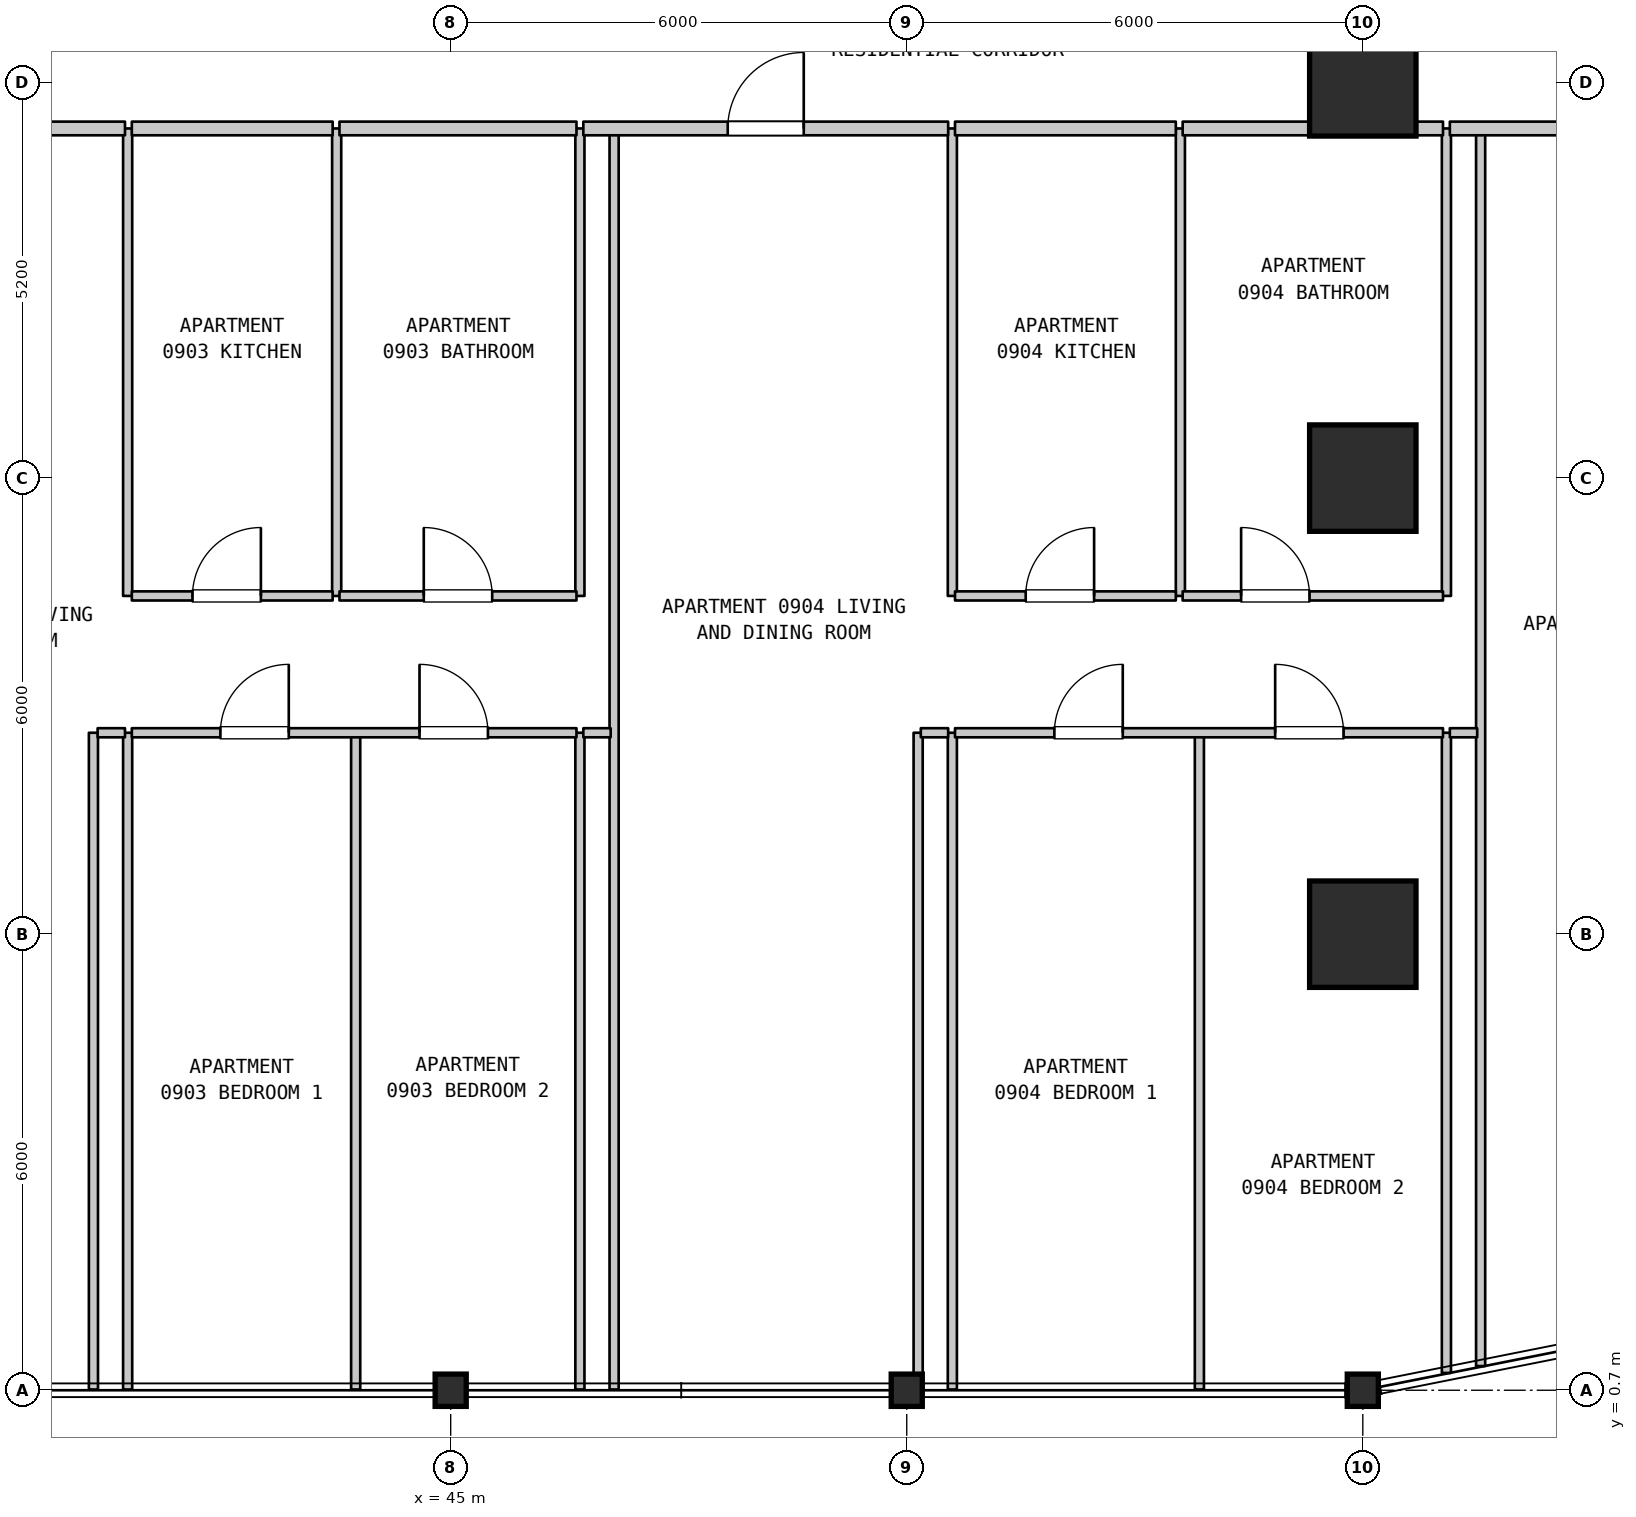
"""IFC4 building model, lengths in metres.
Left out: names, types, materials, properties, quantities, classifications, styles, units other than length and angle.
Written with IfcOpenShell. Run it as: python <this file> out.ifc"""

import sys

from ifc_helpers import new_model, si_unit, direction, frame, frame_2d, origin, origin_2d, place, context, subcontext, project, spatial, rectangle, i_section, extrude, element, fill, save


model = new_model("IFC4")
c1 = context("Model", 3, precision=1e-05, world=origin(), true_north=direction((0.0, 1.0)))
c2 = subcontext(c1, "Body", "Model", "MODEL_VIEW")
j1 = project(units=[si_unit("LENGTHUNIT", "METRE"), si_unit("PLANEANGLEUNIT", "RADIAN")], contexts=[c1])
p1 = place(None, origin())
s1 = spatial("IfcSite", under=j1, at=p1, CompositionType="ELEMENT")
p2 = place(p1, origin())
s2 = spatial("IfcBuilding", under=s1, at=p2, CompositionType="ELEMENT")
p3 = place(p2, frame((0.0, 0.0, 42.5)))
s3 = spatial("IfcBuildingStorey", under=s2, at=p3, CompositionType="ELEMENT", Elevation=42.5)
for number, where, z_axis, x_axis in (
    (1, (45.0, 0.7, 0.0), (0.0, 0.0, 1.0), (1.0, 0.0, 0.0)),
    (2, (51.0, 0.7, 0.0), (0.0, 0.0, 1.0), (1.0, 0.0, 0.0)),
    (3, (57.0, 0.7, 0.0), (0.0, 0.0, 1.0), (1.0, 0.0, 0.0)),
):
    element("IfcColumn", number, at=place(p3, frame(where, z_axis=z_axis, x_axis=x_axis)), inside=s3, PredefinedType="COLUMN", context=c2, shape_type="SweptSolid", body=[
        extrude(i_section(OverallWidth=0.409, OverallDepth=0.425, WebThickness=0.032, FlangeThickness=0.052, FilletRadius=0.015, at=origin_2d()), origin(), (0.0, 0.0, 1.0), 3.7),
    ])
for number, where, z_axis, x_axis in (
    (4, (57.0, 6.7, 0.0), (0.0, 0.0, 1.0), (1.0, 0.0, 0.0)),
    (5, (57.0, 12.7, 0.0), (0.0, 0.0, 1.0), (1.0, 0.0, 0.0)),
    (6, (57.0, 17.9, 0.0), (0.0, 0.0, 1.0), (1.0, 0.0, 0.0)),
):
    element("IfcColumn", number, at=place(p3, frame(where, z_axis=z_axis, x_axis=x_axis)), inside=s3, PredefinedType="COLUMN", context=c2, shape_type="SweptSolid", body=[
        extrude(rectangle(XDim=1.4, YDim=1.4, at=origin_2d()), origin(), (0.0, 0.0, 1.0), 3.7),
    ])
for number, where, z_axis, x_axis in (
    (7, (40.3, 0.71, 0.0), (0.0, 0.0, 1.0), (0.0, 1.0, 0.0)),
    (8, (40.75, 0.71, 0.0), (0.0, 0.0, 1.0), (0.0, 1.0, 0.0)),
):
    element("IfcWall", number, at=place(p3, frame(where, z_axis=z_axis, x_axis=x_axis)), inside=s3, PredefinedType="PARTITIONING", context=c2, shape_type="SweptSolid", body=[
        extrude(rectangle(XDim=8.64, YDim=0.12, at=frame_2d((4.32, 0.0))), origin(), (0.0, 0.0, 1.0), 3.385),
    ])
for number, where, z_axis, x_axis in (
    (9, (40.75, 11.15, 0.0), (0.0, 0.0, 1.0), (0.0, 1.0, 0.0)),
    (10, (43.5, 11.15, 0.0), (0.0, 0.0, 1.0), (0.0, 1.0, 0.0)),
):
    element("IfcWall", number, at=place(p3, frame(where, z_axis=z_axis, x_axis=x_axis)), inside=s3, PredefinedType="PARTITIONING", context=c2, shape_type="SweptSolid", body=[
        extrude(rectangle(XDim=6.15, YDim=0.12, at=frame_2d((3.075, 0.0))), origin(), (0.0, 0.0, 1.0), 3.385),
    ])
for number, where, z_axis, x_axis in (
    (11, (43.75, 0.71, 0.0), (0.0, 0.0, 1.0), (0.0, 1.0, 0.0)),
    (12, (46.7, 0.71, 0.0), (0.0, 0.0, 1.0), (0.0, 1.0, 0.0)),
):
    element("IfcWall", number, at=place(p3, frame(where, z_axis=z_axis, x_axis=x_axis)), inside=s3, PredefinedType="PARTITIONING", context=c2, shape_type="SweptSolid", body=[
        extrude(rectangle(XDim=8.64, YDim=0.12, at=frame_2d((4.32, 0.0))), origin(), (0.0, 0.0, 1.0), 3.385),
    ])
p4 = place(p3, frame((46.7, 11.15, 0.0), z_axis=(0.0, 0.0, 1.0), x_axis=(0.0, 1.0, 0.0)))
e13 = element("IfcWall", 13, at=p4, inside=s3, PredefinedType="PARTITIONING", context=c2, shape_type="SweptSolid", body=[
    extrude(rectangle(XDim=6.15, YDim=0.12, at=frame_2d((3.075, 0.0))), origin(), (0.0, 0.0, 1.0), 3.385),
])
p5 = place(p3, frame((47.15, 0.71, 0.0), z_axis=(0.0, 0.0, 1.0), x_axis=(0.0, 1.0, 0.0)))
e14 = element("IfcWall", 14, at=p5, inside=s3, PredefinedType="PARTITIONING", context=c2, shape_type="SweptSolid", body=[
    extrude(rectangle(XDim=16.59, YDim=0.12, at=frame_2d((8.295, 0.0))), origin(), (0.0, 0.0, 1.0), 3.385),
])
for number, where, z_axis, x_axis in (
    (15, (51.15, 0.71, 0.0), (0.0, 0.0, 1.0), (0.0, 1.0, 0.0)),
    (16, (51.6, 0.71, 0.0), (0.0, 0.0, 1.0), (0.0, 1.0, 0.0)),
):
    element("IfcWall", number, at=place(p3, frame(where, z_axis=z_axis, x_axis=x_axis)), inside=s3, PredefinedType="PARTITIONING", context=c2, shape_type="SweptSolid", body=[
        extrude(rectangle(XDim=8.64, YDim=0.12, at=frame_2d((4.32, 0.0))), origin(), (0.0, 0.0, 1.0), 3.385),
    ])
for number, where, z_axis, x_axis in (
    (17, (51.6, 11.15, 0.0), (0.0, 0.0, 1.0), (0.0, 1.0, 0.0)),
    (18, (54.6, 11.15, 0.0), (0.0, 0.0, 1.0), (0.0, 1.0, 0.0)),
):
    element("IfcWall", number, at=place(p3, frame(where, z_axis=z_axis, x_axis=x_axis)), inside=s3, PredefinedType="PARTITIONING", context=c2, shape_type="SweptSolid", body=[
        extrude(rectangle(XDim=6.15, YDim=0.12, at=frame_2d((3.075, 0.0))), origin(), (0.0, 0.0, 1.0), 3.385),
    ])
p6 = place(p3, frame((54.85, 0.71, 0.0), z_axis=(0.0, 0.0, 1.0), x_axis=(0.0, 1.0, 0.0)))
e19 = element("IfcWall", 19, at=p6, inside=s3, PredefinedType="PARTITIONING", context=c2, shape_type="SweptSolid", body=[
    extrude(rectangle(XDim=8.64, YDim=0.12, at=frame_2d((4.32, 0.0))), origin(), (0.0, 0.0, 1.0), 3.385),
])
p7 = place(p3, frame((58.1, 0.928, 0.0), z_axis=(0.0, 0.0, 1.0), x_axis=(0.0, 1.0, 0.0)))
e20 = element("IfcWall", 20, at=p7, inside=s3, PredefinedType="PARTITIONING", context=c2, shape_type="SweptSolid", body=[
    extrude(rectangle(XDim=8.422, YDim=0.12, at=frame_2d((4.211, 0.0))), origin(), (0.0, 0.0, 1.0), 3.385),
])
p8 = place(p3, frame((58.1, 11.15, 0.0), z_axis=(0.0, 0.0, 1.0), x_axis=(0.0, 1.0, 0.0)))
e21 = element("IfcWall", 21, at=p8, inside=s3, PredefinedType="PARTITIONING", context=c2, shape_type="SweptSolid", body=[
    extrude(rectangle(XDim=6.15, YDim=0.12, at=frame_2d((3.075, 0.0))), origin(), (0.0, 0.0, 1.0), 3.385),
])
p9 = place(p3, frame((58.55, 1.018, 0.0), z_axis=(0.0, 0.0, 1.0), x_axis=(0.0, 1.0, 0.0)))
e22 = element("IfcWall", 22, at=p9, inside=s3, PredefinedType="PARTITIONING", context=c2, shape_type="SweptSolid", body=[
    extrude(rectangle(XDim=16.282, YDim=0.12, at=frame_2d((8.141, 0.0))), origin(), (0.0, 0.0, 1.0), 3.385),
])
p10 = place(p3, frame((40.355, 9.35, 0.0), z_axis=(0.0, 0.0, 1.0), x_axis=(1.0, 0.0, 0.0)))
e23 = element("IfcWall", 23, at=p10, inside=s3, PredefinedType="PARTITIONING", context=c2, shape_type="SweptSolid", body=[
    extrude(rectangle(XDim=0.36, YDim=0.12, at=frame_2d((0.18, 0.0))), origin(), (0.0, 0.0, 1.0), 3.385),
])
p11 = place(p3, frame((40.805, 9.35, 0.0), z_axis=(0.0, 0.0, 1.0), x_axis=(1.0, 0.0, 0.0)))
e24 = element("IfcWall", 24, at=p11, inside=s3, PredefinedType="PARTITIONING", context=c2, shape_type="SweptSolid", body=[
    extrude(rectangle(XDim=5.85, YDim=0.12, at=frame_2d((2.925, 0.0))), origin(), (0.0, 0.0, 1.0), 3.385),
])
p12 = place(p11, frame((1.165, 0.0, 0.0)))
e25 = element("IfcOpeningElement", 25, at=p12, cuts=e24, PredefinedType="OPENING", context=c2, shape_type="SweptSolid", body=[
    extrude(rectangle(XDim=0.9, YDim=2.15, at=frame_2d((0.45, 1.075))), frame((0.0, 0.07, 0.0), z_axis=(0.0, -1.0, 0.0), x_axis=(1.0, 0.0, 0.0)), (0.0, 0.0, 1.0), 0.14),
])
p13 = place(p11, frame((3.785, 0.0, 0.0)))
e26 = element("IfcOpeningElement", 26, at=p13, cuts=e24, PredefinedType="OPENING", context=c2, shape_type="SweptSolid", body=[
    extrude(rectangle(XDim=0.9, YDim=2.15, at=frame_2d((0.45, 1.075))), frame((0.0, 0.07, 0.0), z_axis=(0.0, -1.0, 0.0), x_axis=(1.0, 0.0, 0.0)), (0.0, 0.0, 1.0), 0.14),
])
for number, where, z_axis, x_axis in (
    (27, (46.745, 9.35, 0.0), (0.0, 0.0, 1.0), (1.0, 0.0, 0.0)),
    (28, (51.185, 9.35, 0.0), (0.0, 0.0, 1.0), (1.0, 0.0, 0.0)),
):
    element("IfcWall", number, at=place(p3, frame(where, z_axis=z_axis, x_axis=x_axis)), inside=s3, PredefinedType="PARTITIONING", context=c2, shape_type="SweptSolid", body=[
        extrude(rectangle(XDim=0.36, YDim=0.12, at=frame_2d((0.18, 0.0))), origin(), (0.0, 0.0, 1.0), 3.385),
    ])
p14 = place(p3, frame((51.635, 9.35, 0.0), z_axis=(0.0, 0.0, 1.0), x_axis=(1.0, 0.0, 0.0)))
e29 = element("IfcWall", 29, at=p14, inside=s3, PredefinedType="PARTITIONING", context=c2, shape_type="SweptSolid", body=[
    extrude(rectangle(XDim=6.42, YDim=0.12, at=frame_2d((3.21, 0.0))), origin(), (0.0, 0.0, 1.0), 3.385),
])
p15 = place(p14, frame((1.307, 0.0, 0.0)))
e30 = element("IfcOpeningElement", 30, at=p15, cuts=e29, PredefinedType="OPENING", context=c2, shape_type="SweptSolid", body=[
    extrude(rectangle(XDim=0.9, YDim=2.15, at=frame_2d((0.45, 1.075))), frame((0.0, 0.07, 0.0), z_axis=(0.0, -1.0, 0.0), x_axis=(1.0, 0.0, 0.0)), (0.0, 0.0, 1.0), 0.14),
])
p16 = place(p14, frame((4.212, 0.0, 0.0)))
e31 = element("IfcOpeningElement", 31, at=p16, cuts=e29, PredefinedType="OPENING", context=c2, shape_type="SweptSolid", body=[
    extrude(rectangle(XDim=0.9, YDim=2.15, at=frame_2d((0.45, 1.075))), frame((0.0, 0.07, 0.0), z_axis=(0.0, -1.0, 0.0), x_axis=(1.0, 0.0, 0.0)), (0.0, 0.0, 1.0), 0.14),
])
p17 = place(p3, frame((58.145, 9.35, 0.0), z_axis=(0.0, 0.0, 1.0), x_axis=(1.0, 0.0, 0.0)))
e32 = element("IfcWall", 32, at=p17, inside=s3, PredefinedType="PARTITIONING", context=c2, shape_type="SweptSolid", body=[
    extrude(rectangle(XDim=0.36, YDim=0.12, at=frame_2d((0.18, 0.0))), origin(), (0.0, 0.0, 1.0), 3.385),
])
p18 = place(p3, frame((40.805, 11.15, 0.0), z_axis=(0.0, 0.0, 1.0), x_axis=(1.0, 0.0, 0.0)))
e33 = element("IfcWall", 33, at=p18, inside=s3, PredefinedType="PARTITIONING", context=c2, shape_type="SweptSolid", body=[
    extrude(rectangle(XDim=2.642, YDim=0.12, at=frame_2d((1.321, 0.0))), origin(), (0.0, 0.0, 1.0), 3.385),
])
p19 = place(p18, frame((0.798, 0.0, 0.0)))
e34 = element("IfcOpeningElement", 34, at=p19, cuts=e33, PredefinedType="OPENING", context=c2, shape_type="SweptSolid", body=[
    extrude(rectangle(XDim=0.9, YDim=2.15, at=frame_2d((0.45, 1.075))), frame((0.0, 0.07, 0.0), z_axis=(0.0, -1.0, 0.0), x_axis=(1.0, 0.0, 0.0)), (0.0, 0.0, 1.0), 0.14),
])
p20 = place(p3, frame((43.537, 11.15, 0.0), z_axis=(0.0, 0.0, 1.0), x_axis=(1.0, 0.0, 0.0)))
e35 = element("IfcWall", 35, at=p20, inside=s3, PredefinedType="PARTITIONING", context=c2, shape_type="SweptSolid", body=[
    extrude(rectangle(XDim=3.118, YDim=0.12, at=frame_2d((1.559, 0.0))), origin(), (0.0, 0.0, 1.0), 3.385),
])
p21 = place(p20, frame((1.109, 0.0, 0.0)))
e36 = element("IfcOpeningElement", 36, at=p21, cuts=e35, PredefinedType="OPENING", context=c2, shape_type="SweptSolid", body=[
    extrude(rectangle(XDim=0.9, YDim=2.1, at=frame_2d((0.45, 1.05))), frame((0.0, 0.07, 0.0), z_axis=(0.0, -1.0, 0.0), x_axis=(1.0, 0.0, 0.0)), (0.0, 0.0, 1.0), 0.14),
])
p22 = place(p3, frame((51.635, 11.15, 0.0), z_axis=(0.0, 0.0, 1.0), x_axis=(1.0, 0.0, 0.0)))
e37 = element("IfcWall", 37, at=p22, inside=s3, PredefinedType="PARTITIONING", context=c2, shape_type="SweptSolid", body=[
    extrude(rectangle(XDim=2.905, YDim=0.12, at=frame_2d((1.453, 0.0))), origin(), (0.0, 0.0, 1.0), 3.385),
])
p23 = place(p22, frame((0.93, 0.0, 0.0)))
e38 = element("IfcOpeningElement", 38, at=p23, cuts=e37, PredefinedType="OPENING", context=c2, shape_type="SweptSolid", body=[
    extrude(rectangle(XDim=0.9, YDim=2.15, at=frame_2d((0.45, 1.075))), frame((0.0, 0.07, 0.0), z_axis=(0.0, -1.0, 0.0), x_axis=(1.0, 0.0, 0.0)), (0.0, 0.0, 1.0), 0.14),
])
p24 = place(p3, frame((54.63, 11.15, 0.0), z_axis=(0.0, 0.0, 1.0), x_axis=(1.0, 0.0, 0.0)))
e39 = element("IfcWall", 39, at=p24, inside=s3, PredefinedType="PARTITIONING", context=c2, shape_type="SweptSolid", body=[
    extrude(rectangle(XDim=3.425, YDim=0.12, at=frame_2d((1.712, 0.0))), origin(), (0.0, 0.0, 1.0), 3.385),
])
p25 = place(p24, frame((0.769, 0.0, 0.0)))
e40 = element("IfcOpeningElement", 40, at=p25, cuts=e39, PredefinedType="OPENING", context=c2, shape_type="SweptSolid", body=[
    extrude(rectangle(XDim=0.9, YDim=2.1, at=frame_2d((0.45, 1.05))), frame((0.0, 0.07, 0.0), z_axis=(0.0, -1.0, 0.0), x_axis=(1.0, 0.0, 0.0)), (0.0, 0.0, 1.0), 0.14),
])
p26 = place(p3, frame((36.215, 17.3, 0.0), z_axis=(0.0, 0.0, 1.0), x_axis=(1.0, 0.0, 0.0)))
e41 = element("IfcWall", 41, at=p26, inside=s3, PredefinedType="STANDARD", context=c2, shape_type="SweptSolid", body=[
    extrude(rectangle(XDim=4.5, YDim=0.18, at=frame_2d((2.25, 0.0))), origin(), (0.0, 0.0, 1.0), 3.385),
])
p27 = place(p26, frame((1.879, 0.0, 0.0)))
e42 = element("IfcOpeningElement", 42, at=p27, cuts=e41, PredefinedType="OPENING", context=c2, shape_type="SweptSolid", body=[
    extrude(rectangle(XDim=1.0, YDim=2.15, at=frame_2d((0.5, 1.075))), frame((0.0, 0.1, 0.0), z_axis=(0.0, -1.0, 0.0), x_axis=(1.0, 0.0, 0.0)), (0.0, 0.0, 1.0), 0.2),
])
p28 = place(p3, frame((40.805, 17.3, 0.0), z_axis=(0.0, 0.0, 1.0), x_axis=(1.0, 0.0, 0.0)))
e43 = element("IfcWall", 43, at=p28, inside=s3, PredefinedType="STANDARD", context=c2, shape_type="SweptSolid", body=[
    extrude(rectangle(XDim=2.642, YDim=0.18, at=frame_2d((1.321, 0.0))), origin(), (0.0, 0.0, 1.0), 3.385),
])
p29 = place(p3, frame((43.537, 17.3, 0.0), z_axis=(0.0, 0.0, 1.0), x_axis=(1.0, 0.0, 0.0)))
e44 = element("IfcWall", 44, at=p29, inside=s3, PredefinedType="STANDARD", context=c2, shape_type="SweptSolid", body=[
    extrude(rectangle(XDim=3.118, YDim=0.18, at=frame_2d((1.559, 0.0))), origin(), (0.0, 0.0, 1.0), 3.385),
])
p30 = place(p3, frame((46.745, 17.3, 0.0), z_axis=(0.0, 0.0, 1.0), x_axis=(1.0, 0.0, 0.0)))
e45 = element("IfcWall", 45, at=p30, inside=s3, PredefinedType="STANDARD", context=c2, shape_type="SweptSolid", body=[
    extrude(rectangle(XDim=4.8, YDim=0.18, at=frame_2d((2.4, 0.0))), origin(), (0.0, 0.0, 1.0), 3.385),
])
p31 = place(p30, frame((1.9, 0.0, 0.0)))
e46 = element("IfcOpeningElement", 46, at=p31, cuts=e45, PredefinedType="OPENING", context=c2, shape_type="SweptSolid", body=[
    extrude(rectangle(XDim=1.0, YDim=2.15, at=frame_2d((0.5, 1.075))), frame((0.0, 0.1, 0.0), z_axis=(0.0, -1.0, 0.0), x_axis=(1.0, 0.0, 0.0)), (0.0, 0.0, 1.0), 0.2),
])
p32 = place(p3, frame((51.635, 17.3, 0.0), z_axis=(0.0, 0.0, 1.0), x_axis=(1.0, 0.0, 0.0)))
e47 = element("IfcWall", 47, at=p32, inside=s3, PredefinedType="STANDARD", context=c2, shape_type="SweptSolid", body=[
    extrude(rectangle(XDim=2.905, YDim=0.18, at=frame_2d((1.453, 0.0))), origin(), (0.0, 0.0, 1.0), 3.385),
])
p33 = place(p3, frame((54.63, 17.3, 0.0), z_axis=(0.0, 0.0, 1.0), x_axis=(1.0, 0.0, 0.0)))
e48 = element("IfcWall", 48, at=p33, inside=s3, PredefinedType="STANDARD", context=c2, shape_type="SweptSolid", body=[
    extrude(rectangle(XDim=3.425, YDim=0.18, at=frame_2d((1.712, 0.0))), origin(), (0.0, 0.0, 1.0), 3.385),
])
p34 = place(p3, frame((58.145, 17.3, 0.0), z_axis=(0.0, 0.0, 1.0), x_axis=(1.0, 0.0, 0.0)))
e49 = element("IfcWall", 49, at=p34, inside=s3, PredefinedType="STANDARD", context=c2, shape_type="SweptSolid", body=[
    extrude(rectangle(XDim=4.76, YDim=0.18, at=frame_2d((2.38, 0.0))), origin(), (0.0, 0.0, 1.0), 3.385),
])
p35 = place(p34, frame((2.01, 0.0, 0.0)))
e50 = element("IfcOpeningElement", 50, at=p35, cuts=e49, PredefinedType="OPENING", context=c2, shape_type="SweptSolid", body=[
    extrude(rectangle(XDim=1.0, YDim=2.15, at=frame_2d((0.5, 1.075))), frame((0.0, 0.1, 0.0), z_axis=(0.0, -1.0, 0.0), x_axis=(1.0, 0.0, 0.0)), (0.0, 0.0, 1.0), 0.2),
])
p36 = place(p12, origin())
e51 = element("IfcDoor", 51, at=p36, inside=s3, OperationType="SINGLE_SWING_RIGHT", PredefinedType="DOOR", context=c2, shape_type="SweptSolid", body=[
    extrude(rectangle(XDim=0.9, YDim=2.15, at=frame_2d((0.45, 1.075))), frame((0.0, 0.025, 0.0), z_axis=(0.0, -1.0, 0.0), x_axis=(1.0, 0.0, 0.0)), (0.0, 0.0, 1.0), 0.05),
])
fill(e25, e51)
p37 = place(p13, origin())
e52 = element("IfcDoor", 52, at=p37, inside=s3, OperationType="SINGLE_SWING_LEFT", PredefinedType="DOOR", context=c2, shape_type="SweptSolid", body=[
    extrude(rectangle(XDim=0.9, YDim=2.15, at=frame_2d((0.45, 1.075))), frame((0.0, 0.025, 0.0), z_axis=(0.0, -1.0, 0.0), x_axis=(1.0, 0.0, 0.0)), (0.0, 0.0, 1.0), 0.05),
])
fill(e26, e52)
p38 = place(p15, origin())
e53 = element("IfcDoor", 53, at=p38, inside=s3, OperationType="SINGLE_SWING_RIGHT", PredefinedType="DOOR", context=c2, shape_type="SweptSolid", body=[
    extrude(rectangle(XDim=0.9, YDim=2.15, at=frame_2d((0.45, 1.075))), frame((0.0, 0.025, 0.0), z_axis=(0.0, -1.0, 0.0), x_axis=(1.0, 0.0, 0.0)), (0.0, 0.0, 1.0), 0.05),
])
fill(e30, e53)
p39 = place(p16, origin())
e54 = element("IfcDoor", 54, at=p39, inside=s3, OperationType="SINGLE_SWING_LEFT", PredefinedType="DOOR", context=c2, shape_type="SweptSolid", body=[
    extrude(rectangle(XDim=0.9, YDim=2.15, at=frame_2d((0.45, 1.075))), frame((0.0, 0.025, 0.0), z_axis=(0.0, -1.0, 0.0), x_axis=(1.0, 0.0, 0.0)), (0.0, 0.0, 1.0), 0.05),
])
fill(e31, e54)
p40 = place(p19, origin())
e55 = element("IfcDoor", 55, at=p40, inside=s3, OperationType="SINGLE_SWING_RIGHT", PredefinedType="DOOR", context=c2, shape_type="SweptSolid", body=[
    extrude(rectangle(XDim=0.9, YDim=2.15, at=frame_2d((0.45, 1.075))), frame((0.0, 0.025, 0.0), z_axis=(0.0, -1.0, 0.0), x_axis=(1.0, 0.0, 0.0)), (0.0, 0.0, 1.0), 0.05),
])
fill(e34, e55)
p41 = place(p21, origin())
e56 = element("IfcDoor", 56, at=p41, inside=s3, OperationType="SINGLE_SWING_LEFT", PredefinedType="DOOR", context=c2, shape_type="SweptSolid", body=[
    extrude(rectangle(XDim=0.9, YDim=2.1, at=frame_2d((0.45, 1.05))), frame((0.0, 0.025, 0.0), z_axis=(0.0, -1.0, 0.0), x_axis=(1.0, 0.0, 0.0)), (0.0, 0.0, 1.0), 0.05),
])
fill(e36, e56)
p42 = place(p23, origin())
e57 = element("IfcDoor", 57, at=p42, inside=s3, OperationType="SINGLE_SWING_RIGHT", PredefinedType="DOOR", context=c2, shape_type="SweptSolid", body=[
    extrude(rectangle(XDim=0.9, YDim=2.15, at=frame_2d((0.45, 1.075))), frame((0.0, 0.025, 0.0), z_axis=(0.0, -1.0, 0.0), x_axis=(1.0, 0.0, 0.0)), (0.0, 0.0, 1.0), 0.05),
])
fill(e38, e57)
p43 = place(p25, origin())
e58 = element("IfcDoor", 58, at=p43, inside=s3, OperationType="SINGLE_SWING_LEFT", PredefinedType="DOOR", context=c2, shape_type="SweptSolid", body=[
    extrude(rectangle(XDim=0.9, YDim=2.1, at=frame_2d((0.45, 1.05))), frame((0.0, 0.025, 0.0), z_axis=(0.0, -1.0, 0.0), x_axis=(1.0, 0.0, 0.0)), (0.0, 0.0, 1.0), 0.05),
])
fill(e40, e58)
p44 = place(p31, origin())
e59 = element("IfcDoor", 59, at=p44, inside=s3, OperationType="SINGLE_SWING_RIGHT", PredefinedType="DOOR", context=c2, shape_type="SweptSolid", body=[
    extrude(rectangle(XDim=1.0, YDim=2.15, at=frame_2d((0.5, 1.075))), frame((0.0, 0.025, 0.0), z_axis=(0.0, -1.0, 0.0), x_axis=(1.0, 0.0, 0.0)), (0.0, 0.0, 1.0), 0.05),
])
fill(e46, e59)
save(model, sys.argv[1])
